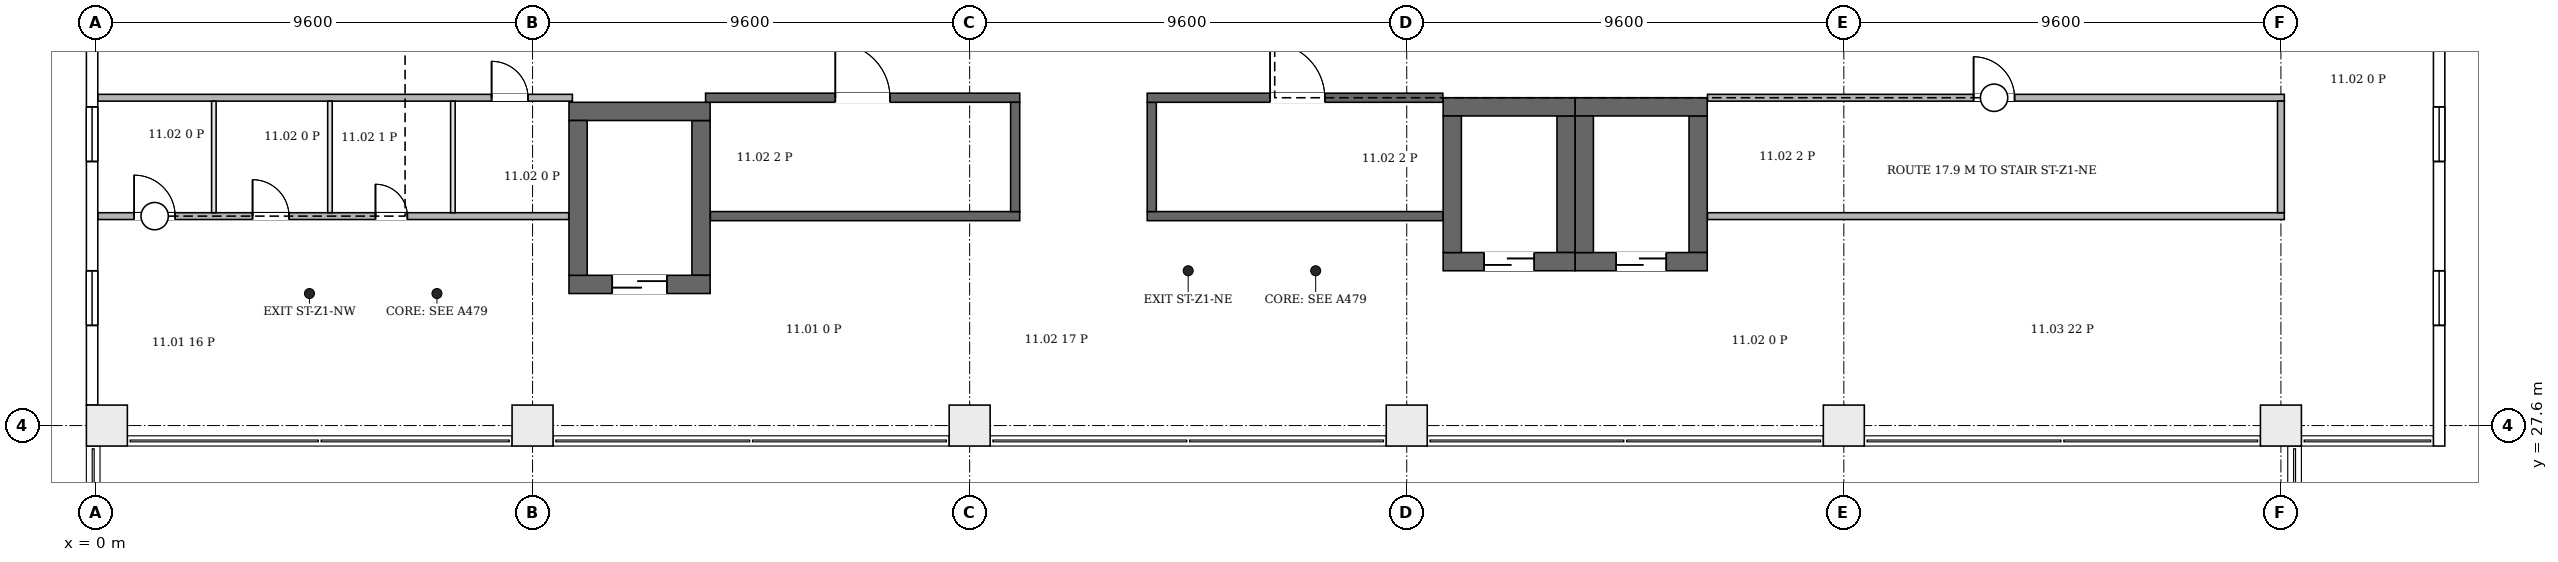
"""IFC4 building model, lengths in metres.
Left out: names, types, materials, properties, quantities, classifications, styles, units other than length and angle.
Written with IfcOpenShell. Run it as: python <this file> out.ifc"""

import sys

from ifc_helpers import new_model, si_unit, direction, frame, frame_2d, origin, origin_2d, place, context, subcontext, project, spatial, rectangle, extrude, element, fill, save


model = new_model("IFC4")
c1 = context("Model", 3, precision=1e-05, world=origin(), true_north=direction((0.0, 1.0)))
c2 = subcontext(c1, "Body", "Model", "MODEL_VIEW")
j1 = project(units=[si_unit("LENGTHUNIT", "METRE"), si_unit("PLANEANGLEUNIT", "RADIAN")], contexts=[c1])
p1 = place(None, origin())
s1 = spatial("IfcSite", under=j1, at=p1, CompositionType="ELEMENT")
p2 = place(p1, origin())
s2 = spatial("IfcBuilding", under=s1, at=p2, CompositionType="ELEMENT")
p3 = place(p2, frame((0.0, 0.0, 57.1)))
s3 = spatial("IfcBuildingStorey", under=s2, at=p3, CompositionType="ELEMENT", Elevation=57.1)
p4 = place(p3, frame((10.4, 30.7, 0.0), z_axis=(0.0, 0.0, 1.0), x_axis=(1.0, 0.0, 0.0)))
e1 = element("IfcWall", 1, at=p4, inside=s3, PredefinedType="SHEAR", context=c2, shape_type="SweptSolid", body=[
    extrude(rectangle(XDim=3.1, YDim=0.4, at=frame_2d((1.55, 0.0))), origin(), (0.0, 0.0, 1.0), 4.2),
])
p5 = place(p4, frame((0.95, 0.0, 0.0)))
e2 = element("IfcOpeningElement", 2, at=p5, cuts=e1, PredefinedType="OPENING", context=c2, shape_type="SweptSolid", body=[
    extrude(rectangle(XDim=1.2, YDim=2.1, at=frame_2d((0.6, 1.05))), frame((0.0, 0.21, 0.0), z_axis=(0.0, -1.0, 0.0), x_axis=(1.0, 0.0, 0.0)), (0.0, 0.0, 1.0), 0.42),
])
p6 = place(p3, frame((10.4, 34.5, 0.0), z_axis=(0.0, 0.0, 1.0), x_axis=(1.0, 0.0, 0.0)))
e3 = element("IfcWall", 3, at=p6, inside=s3, PredefinedType="SHEAR", context=c2, shape_type="SweptSolid", body=[
    extrude(rectangle(XDim=3.1, YDim=0.4, at=frame_2d((1.55, 0.0))), origin(), (0.0, 0.0, 1.0), 4.2),
])
for number, where, z_axis, x_axis in (
    (4, (10.6, 30.9, 0.0), (0.0, 0.0, 1.0), (0.0, 1.0, 0.0)),
    (5, (13.3, 30.9, 0.0), (0.0, 0.0, 1.0), (0.0, 1.0, 0.0)),
):
    element("IfcWall", number, at=place(p3, frame(where, z_axis=z_axis, x_axis=x_axis)), inside=s3, PredefinedType="SHEAR", context=c2, shape_type="SweptSolid", body=[
        extrude(rectangle(XDim=3.4, YDim=0.4, at=frame_2d((1.7, 0.0))), origin(), (0.0, 0.0, 1.0), 4.2),
    ])
p7 = place(p3, frame((29.6, 31.2, 0.0), z_axis=(0.0, 0.0, 1.0), x_axis=(1.0, 0.0, 0.0)))
e6 = element("IfcWall", 6, at=p7, inside=s3, PredefinedType="SHEAR", context=c2, shape_type="SweptSolid", body=[
    extrude(rectangle(XDim=2.9, YDim=0.4, at=frame_2d((1.45, 0.0))), origin(), (0.0, 0.0, 1.0), 4.2),
])
p8 = place(p7, frame((0.9, 0.0, 0.0)))
e7 = element("IfcOpeningElement", 7, at=p8, cuts=e6, PredefinedType="OPENING", context=c2, shape_type="SweptSolid", body=[
    extrude(rectangle(XDim=1.1, YDim=2.1, at=frame_2d((0.55, 1.05))), frame((0.0, 0.21, 0.0), z_axis=(0.0, -1.0, 0.0), x_axis=(1.0, 0.0, 0.0)), (0.0, 0.0, 1.0), 0.42),
])
p9 = place(p3, frame((29.6, 34.6, 0.0), z_axis=(0.0, 0.0, 1.0), x_axis=(1.0, 0.0, 0.0)))
e8 = element("IfcWall", 8, at=p9, inside=s3, PredefinedType="SHEAR", context=c2, shape_type="SweptSolid", body=[
    extrude(rectangle(XDim=2.9, YDim=0.4, at=frame_2d((1.45, 0.0))), origin(), (0.0, 0.0, 1.0), 4.2),
])
for number, where, z_axis, x_axis in (
    (9, (29.8, 31.4, 0.0), (0.0, 0.0, 1.0), (0.0, 1.0, 0.0)),
    (10, (32.3, 31.4, 0.0), (0.0, 0.0, 1.0), (0.0, 1.0, 0.0)),
):
    element("IfcWall", number, at=place(p3, frame(where, z_axis=z_axis, x_axis=x_axis)), inside=s3, PredefinedType="SHEAR", context=c2, shape_type="SweptSolid", body=[
        extrude(rectangle(XDim=3.0, YDim=0.4, at=frame_2d((1.5, 0.0))), origin(), (0.0, 0.0, 1.0), 4.2),
    ])
p10 = place(p3, frame((32.5, 31.2, 0.0), z_axis=(0.0, 0.0, 1.0), x_axis=(1.0, 0.0, 0.0)))
e11 = element("IfcWall", 11, at=p10, inside=s3, PredefinedType="SHEAR", context=c2, shape_type="SweptSolid", body=[
    extrude(rectangle(XDim=2.9, YDim=0.4, at=frame_2d((1.45, 0.0))), origin(), (0.0, 0.0, 1.0), 4.2),
])
p11 = place(p10, frame((0.9, 0.0, 0.0)))
e12 = element("IfcOpeningElement", 12, at=p11, cuts=e11, PredefinedType="OPENING", context=c2, shape_type="SweptSolid", body=[
    extrude(rectangle(XDim=1.1, YDim=2.1, at=frame_2d((0.55, 1.05))), frame((0.0, 0.21, 0.0), z_axis=(0.0, -1.0, 0.0), x_axis=(1.0, 0.0, 0.0)), (0.0, 0.0, 1.0), 0.42),
])
p12 = place(p3, frame((32.5, 34.6, 0.0), z_axis=(0.0, 0.0, 1.0), x_axis=(1.0, 0.0, 0.0)))
e13 = element("IfcWall", 13, at=p12, inside=s3, PredefinedType="SHEAR", context=c2, shape_type="SweptSolid", body=[
    extrude(rectangle(XDim=2.9, YDim=0.4, at=frame_2d((1.45, 0.0))), origin(), (0.0, 0.0, 1.0), 4.2),
])
for number, where, z_axis, x_axis in (
    (14, (32.7, 31.4, 0.0), (0.0, 0.0, 1.0), (0.0, 1.0, 0.0)),
    (15, (35.2, 31.4, 0.0), (0.0, 0.0, 1.0), (0.0, 1.0, 0.0)),
):
    element("IfcWall", number, at=place(p3, frame(where, z_axis=z_axis, x_axis=x_axis)), inside=s3, PredefinedType="SHEAR", context=c2, shape_type="SweptSolid", body=[
        extrude(rectangle(XDim=3.0, YDim=0.4, at=frame_2d((1.5, 0.0))), origin(), (0.0, 0.0, 1.0), 4.2),
    ])
for number, where, z_axis, x_axis in (
    (16, (0.25, 27.6, 0.0), (0.0, 0.0, 1.0), (1.0, 0.0, 0.0)),
    (17, (9.6, 27.6, 0.0), (0.0, 0.0, 1.0), (1.0, 0.0, 0.0)),
    (18, (19.2, 27.6, 0.0), (0.0, 0.0, 1.0), (1.0, 0.0, 0.0)),
    (19, (28.8, 27.6, 0.0), (0.0, 0.0, 1.0), (1.0, 0.0, 0.0)),
    (20, (38.4, 27.6, 0.0), (0.0, 0.0, 1.0), (1.0, 0.0, 0.0)),
    (21, (48.0, 27.6, 0.0), (0.0, 0.0, 1.0), (1.0, 0.0, 0.0)),
):
    element("IfcColumn", number, at=place(p3, frame(where, z_axis=z_axis, x_axis=x_axis)), inside=s3, PredefinedType="COLUMN", context=c2, shape_type="SweptSolid", body=[
        extrude(rectangle(XDim=0.9, YDim=0.9, at=origin_2d()), origin(), (0.0, 0.0, 1.0), 4.2),
    ])
p13 = place(p3, frame((-0.074, 36.35, 0.0), z_axis=(0.0, 0.0, 1.0), x_axis=(0.0, -1.0, 0.0)))
e22 = element("IfcWall", 22, at=p13, inside=s3, PredefinedType="ELEMENTEDWALL", context=c2, shape_type="SweptSolid", body=[
    extrude(rectangle(XDim=8.3, YDim=0.25, at=frame_2d((4.15, 0.0))), origin(), (0.0, 0.0, 1.0), 3.9),
])
p14 = place(p13, frame((5.35, 0.0, 0.9)))
e23 = element("IfcOpeningElement", 23, at=p14, cuts=e22, PredefinedType="OPENING", context=c2, shape_type="SweptSolid", body=[
    extrude(rectangle(XDim=1.2, YDim=2.6, at=frame_2d((0.6, 1.3))), frame((0.0, 0.135, 0.0), z_axis=(0.0, -1.0, 0.0), x_axis=(1.0, 0.0, 0.0)), (0.0, 0.0, 1.0), 0.27),
])
p15 = place(p13, frame((1.75, 0.0, 0.9)))
e24 = element("IfcOpeningElement", 24, at=p15, cuts=e22, PredefinedType="OPENING", context=c2, shape_type="SweptSolid", body=[
    extrude(rectangle(XDim=1.2, YDim=2.6, at=frame_2d((0.6, 1.3))), frame((0.0, 0.135, 0.0), z_axis=(0.0, -1.0, 0.0), x_axis=(1.0, 0.0, 0.0)), (0.0, 0.0, 1.0), 0.27),
])
p16 = place(p3, frame((51.475, 27.15, 0.0), z_axis=(0.0, 0.0, 1.0), x_axis=(0.0, 1.0, 0.0)))
e25 = element("IfcWall", 25, at=p16, inside=s3, PredefinedType="ELEMENTEDWALL", context=c2, shape_type="SweptSolid", body=[
    extrude(rectangle(XDim=19.3, YDim=0.25, at=frame_2d((9.65, 0.0))), origin(), (0.0, 0.0, 1.0), 3.2),
])
p17 = place(p16, frame((2.65, 0.0, 0.6)))
e26 = element("IfcOpeningElement", 26, at=p17, cuts=e25, PredefinedType="OPENING", context=c2, shape_type="SweptSolid", body=[
    extrude(rectangle(XDim=1.2, YDim=2.5, at=frame_2d((0.6, 1.25))), frame((0.0, 0.135, 0.0), z_axis=(0.0, -1.0, 0.0), x_axis=(1.0, 0.0, 0.0)), (0.0, 0.0, 1.0), 0.27),
])
p18 = place(p16, frame((6.25, 0.0, 0.6)))
e27 = element("IfcOpeningElement", 27, at=p18, cuts=e25, PredefinedType="OPENING", context=c2, shape_type="SweptSolid", body=[
    extrude(rectangle(XDim=1.2, YDim=2.5, at=frame_2d((0.6, 1.25))), frame((0.0, 0.135, 0.0), z_axis=(0.0, -1.0, 0.0), x_axis=(1.0, 0.0, 0.0)), (0.0, 0.0, 1.0), 0.27),
])
p19 = place(p16, frame((11.85, 0.0, 0.6)))
e28 = element("IfcOpeningElement", 28, at=p19, cuts=e25, PredefinedType="OPENING", context=c2, shape_type="SweptSolid", body=[
    extrude(rectangle(XDim=1.2, YDim=2.5, at=frame_2d((0.6, 1.25))), frame((0.0, 0.135, 0.0), z_axis=(0.0, -1.0, 0.0), x_axis=(1.0, 0.0, 0.0)), (0.0, 0.0, 1.0), 0.27),
])
p20 = place(p16, frame((15.45, 0.0, 0.6)))
e29 = element("IfcOpeningElement", 29, at=p20, cuts=e25, PredefinedType="OPENING", context=c2, shape_type="SweptSolid", body=[
    extrude(rectangle(XDim=1.2, YDim=2.5, at=frame_2d((0.6, 1.25))), frame((0.0, 0.135, 0.0), z_axis=(0.0, -1.0, 0.0), x_axis=(1.0, 0.0, 0.0)), (0.0, 0.0, 1.0), 0.27),
])
p21 = place(p3, frame((0.056, 32.2, 0.0), z_axis=(0.0, 0.0, 1.0), x_axis=(1.0, 0.0, 0.0)))
e30 = element("IfcWall", 30, at=p21, inside=s3, PredefinedType="PARTITIONING", context=c2, shape_type="SweptSolid", body=[
    extrude(rectangle(XDim=10.338, YDim=0.15, at=frame_2d((5.169, 0.0))), origin(), (0.0, 0.0, 1.0), 3.9),
])
p22 = place(p21, frame((0.794, 0.0, 0.0)))
e31 = element("IfcOpeningElement", 31, at=p22, cuts=e30, PredefinedType="OPENING", context=c2, shape_type="SweptSolid", body=[
    extrude(rectangle(XDim=0.9, YDim=2.1, at=frame_2d((0.45, 1.05))), frame((0.0, 0.085, 0.0), z_axis=(0.0, -1.0, 0.0), x_axis=(1.0, 0.0, 0.0)), (0.0, 0.0, 1.0), 0.17),
])
p23 = place(p21, frame((3.394, 0.0, 0.0)))
e32 = element("IfcOpeningElement", 32, at=p23, cuts=e30, PredefinedType="OPENING", context=c2, shape_type="SweptSolid", body=[
    extrude(rectangle(XDim=0.8, YDim=2.1, at=frame_2d((0.4, 1.05))), frame((0.0, 0.085, 0.0), z_axis=(0.0, -1.0, 0.0), x_axis=(1.0, 0.0, 0.0)), (0.0, 0.0, 1.0), 0.17),
])
p24 = place(p21, frame((6.094, 0.0, 0.0)))
e33 = element("IfcOpeningElement", 33, at=p24, cuts=e30, PredefinedType="OPENING", context=c2, shape_type="SweptSolid", body=[
    extrude(rectangle(XDim=0.7, YDim=2.1, at=frame_2d((0.35, 1.05))), frame((0.0, 0.085, 0.0), z_axis=(0.0, -1.0, 0.0), x_axis=(1.0, 0.0, 0.0)), (0.0, 0.0, 1.0), 0.17),
])
p25 = place(p3, frame((0.056, 34.8, 0.0), z_axis=(0.0, 0.0, 1.0), x_axis=(1.0, 0.0, 0.0)))
e34 = element("IfcWall", 34, at=p25, inside=s3, PredefinedType="PARTITIONING", context=c2, shape_type="SweptSolid", body=[
    extrude(rectangle(XDim=10.419, YDim=0.15, at=frame_2d((5.209, 0.0))), origin(), (0.0, 0.0, 1.0), 3.9),
])
p26 = place(p25, frame((8.644, 0.0, 0.0)))
e35 = element("IfcOpeningElement", 35, at=p26, cuts=e34, PredefinedType="OPENING", context=c2, shape_type="SweptSolid", body=[
    extrude(rectangle(XDim=0.8, YDim=2.1, at=frame_2d((0.4, 1.05))), frame((0.0, 0.085, 0.0), z_axis=(0.0, -1.0, 0.0), x_axis=(1.0, 0.0, 0.0)), (0.0, 0.0, 1.0), 0.17),
])
for number, where, z_axis, x_axis in (
    (36, (2.6, 32.275, 0.0), (0.0, 0.0, 1.0), (0.0, 1.0, 0.0)),
    (37, (5.15, 32.275, 0.0), (0.0, 0.0, 1.0), (0.0, 1.0, 0.0)),
    (38, (7.85, 32.275, 0.0), (0.0, 0.0, 1.0), (0.0, 1.0, 0.0)),
):
    element("IfcWall", number, at=place(p3, frame(where, z_axis=z_axis, x_axis=x_axis)), inside=s3, PredefinedType="PARTITIONING", context=c2, shape_type="SweptSolid", body=[
        extrude(rectangle(XDim=2.45, YDim=0.1, at=frame_2d((1.225, 0.0))), origin(), (0.0, 0.0, 1.0), 3.9),
    ])
p27 = place(p3, frame((13.4, 34.8, 0.0), z_axis=(0.0, 0.0, 1.0), x_axis=(1.0, 0.0, 0.0)))
e39 = element("IfcWall", 39, at=p27, inside=s3, PredefinedType="PARTITIONING", context=c2, shape_type="SweptSolid", body=[
    extrude(rectangle(XDim=6.9, YDim=0.2, at=frame_2d((3.45, 0.0))), origin(), (0.0, 0.0, 1.0), 3.9),
])
p28 = place(p27, frame((2.85, 0.0, 0.0)))
e40 = element("IfcOpeningElement", 40, at=p28, cuts=e39, PredefinedType="OPENING", context=c2, shape_type="SweptSolid", body=[
    extrude(rectangle(XDim=1.2, YDim=2.1, at=frame_2d((0.6, 1.05))), frame((0.0, 0.11, 0.0), z_axis=(0.0, -1.0, 0.0), x_axis=(1.0, 0.0, 0.0)), (0.0, 0.0, 1.0), 0.22),
])
p29 = place(p3, frame((13.506, 32.2, 0.0), z_axis=(0.0, 0.0, 1.0), x_axis=(1.0, 0.0, 0.0)))
e41 = element("IfcWall", 41, at=p29, inside=s3, PredefinedType="PARTITIONING", context=c2, shape_type="SweptSolid", body=[
    extrude(rectangle(XDim=6.794, YDim=0.2, at=frame_2d((3.397, 0.0))), origin(), (0.0, 0.0, 1.0), 3.9),
])
p30 = place(p3, frame((20.2, 32.3, 0.0), z_axis=(0.0, 0.0, 1.0), x_axis=(0.0, 1.0, 0.0)))
e42 = element("IfcWall", 42, at=p30, inside=s3, PredefinedType="PARTITIONING", context=c2, shape_type="SweptSolid", body=[
    extrude(rectangle(XDim=2.4, YDim=0.2, at=frame_2d((1.2, 0.0))), origin(), (0.0, 0.0, 1.0), 3.9),
])
p31 = place(p3, frame((23.1, 32.2, 0.0), z_axis=(0.0, 0.0, 1.0), x_axis=(1.0, 0.0, 0.0)))
e43 = element("IfcWall", 43, at=p31, inside=s3, PredefinedType="PARTITIONING", context=c2, shape_type="SweptSolid", body=[
    extrude(rectangle(XDim=6.494, YDim=0.2, at=frame_2d((3.247, 0.0))), origin(), (0.0, 0.0, 1.0), 3.9),
])
p32 = place(p3, frame((23.2, 32.3, 0.0), z_axis=(0.0, 0.0, 1.0), x_axis=(0.0, 1.0, 0.0)))
e44 = element("IfcWall", 44, at=p32, inside=s3, PredefinedType="PARTITIONING", context=c2, shape_type="SweptSolid", body=[
    extrude(rectangle(XDim=2.4, YDim=0.2, at=frame_2d((1.2, 0.0))), origin(), (0.0, 0.0, 1.0), 3.9),
])
p33 = place(p3, frame((23.1, 34.8, 0.0), z_axis=(0.0, 0.0, 1.0), x_axis=(1.0, 0.0, 0.0)))
e45 = element("IfcWall", 45, at=p33, inside=s3, PredefinedType="PARTITIONING", context=c2, shape_type="SweptSolid", body=[
    extrude(rectangle(XDim=6.494, YDim=0.2, at=frame_2d((3.247, 0.0))), origin(), (0.0, 0.0, 1.0), 3.9),
])
p34 = place(p33, frame((2.7, 0.0, 0.0)))
e46 = element("IfcOpeningElement", 46, at=p34, cuts=e45, PredefinedType="OPENING", context=c2, shape_type="SweptSolid", body=[
    extrude(rectangle(XDim=1.2, YDim=2.1, at=frame_2d((0.6, 1.05))), frame((0.0, 0.11, 0.0), z_axis=(0.0, -1.0, 0.0), x_axis=(1.0, 0.0, 0.0)), (0.0, 0.0, 1.0), 0.22),
])
p35 = place(p3, frame((35.406, 32.2, 0.0), z_axis=(0.0, 0.0, 1.0), x_axis=(1.0, 0.0, 0.0)))
e47 = element("IfcWall", 47, at=p35, inside=s3, PredefinedType="PARTITIONING", context=c2, shape_type="SweptSolid", body=[
    extrude(rectangle(XDim=12.669, YDim=0.15, at=frame_2d((6.334, 0.0))), origin(), (0.0, 0.0, 1.0), 3.9),
])
p36 = place(p3, frame((35.406, 34.8, 0.0), z_axis=(0.0, 0.0, 1.0), x_axis=(1.0, 0.0, 0.0)))
e48 = element("IfcWall", 48, at=p36, inside=s3, PredefinedType="PARTITIONING", context=c2, shape_type="SweptSolid", body=[
    extrude(rectangle(XDim=12.669, YDim=0.15, at=frame_2d((6.334, 0.0))), origin(), (0.0, 0.0, 1.0), 3.9),
])
p37 = place(p36, frame((5.844, 0.0, 0.0)))
e49 = element("IfcOpeningElement", 49, at=p37, cuts=e48, PredefinedType="OPENING", context=c2, shape_type="SweptSolid", body=[
    extrude(rectangle(XDim=0.9, YDim=2.1, at=frame_2d((0.45, 1.05))), frame((0.0, 0.085, 0.0), z_axis=(0.0, -1.0, 0.0), x_axis=(1.0, 0.0, 0.0)), (0.0, 0.0, 1.0), 0.17),
])
p38 = place(p3, frame((48.0, 32.275, 0.0), z_axis=(0.0, 0.0, 1.0), x_axis=(0.0, 1.0, 0.0)))
e50 = element("IfcWall", 50, at=p38, inside=s3, PredefinedType="PARTITIONING", context=c2, shape_type="SweptSolid", body=[
    extrude(rectangle(XDim=2.45, YDim=0.15, at=frame_2d((1.225, 0.0))), origin(), (0.0, 0.0, 1.0), 3.3),
])
p39 = place(p14, origin())
e51 = element("IfcWindow", 51, at=p39, inside=s3, PartitioningType="SINGLE_PANEL", PredefinedType="WINDOW", context=c2, shape_type="SweptSolid", body=[
    extrude(rectangle(XDim=1.2, YDim=2.6, at=frame_2d((0.6, 1.3))), frame((0.0, 0.03, 0.0), z_axis=(0.0, -1.0, 0.0), x_axis=(1.0, 0.0, 0.0)), (0.0, 0.0, 1.0), 0.06),
])
fill(e23, e51)
p40 = place(p15, origin())
e52 = element("IfcWindow", 52, at=p40, inside=s3, PartitioningType="SINGLE_PANEL", PredefinedType="WINDOW", context=c2, shape_type="SweptSolid", body=[
    extrude(rectangle(XDim=1.2, YDim=2.6, at=frame_2d((0.6, 1.3))), frame((0.0, 0.03, 0.0), z_axis=(0.0, -1.0, 0.0), x_axis=(1.0, 0.0, 0.0)), (0.0, 0.0, 1.0), 0.06),
])
fill(e24, e52)
p41 = place(p17, origin())
e53 = element("IfcWindow", 53, at=p41, inside=s3, PartitioningType="SINGLE_PANEL", PredefinedType="WINDOW", context=c2, shape_type="SweptSolid", body=[
    extrude(rectangle(XDim=1.2, YDim=2.5, at=frame_2d((0.6, 1.25))), frame((0.0, 0.03, 0.0), z_axis=(0.0, -1.0, 0.0), x_axis=(1.0, 0.0, 0.0)), (0.0, 0.0, 1.0), 0.06),
])
fill(e26, e53)
p42 = place(p18, origin())
e54 = element("IfcWindow", 54, at=p42, inside=s3, PartitioningType="SINGLE_PANEL", PredefinedType="WINDOW", context=c2, shape_type="SweptSolid", body=[
    extrude(rectangle(XDim=1.2, YDim=2.5, at=frame_2d((0.6, 1.25))), frame((0.0, 0.03, 0.0), z_axis=(0.0, -1.0, 0.0), x_axis=(1.0, 0.0, 0.0)), (0.0, 0.0, 1.0), 0.06),
])
fill(e27, e54)
p43 = place(p5, origin())
e55 = element("IfcDoor", 55, at=p43, inside=s3, OperationType="DOUBLE_DOOR_SLIDING", PredefinedType="DOOR", context=c2, shape_type="SweptSolid", body=[
    extrude(rectangle(XDim=1.2, YDim=2.1, at=frame_2d((0.6, 1.05))), frame((0.0, 0.025, 0.0), z_axis=(0.0, -1.0, 0.0), x_axis=(1.0, 0.0, 0.0)), (0.0, 0.0, 1.0), 0.05),
])
fill(e2, e55)
p44 = place(p8, origin())
e56 = element("IfcDoor", 56, at=p44, inside=s3, OperationType="DOUBLE_DOOR_SLIDING", PredefinedType="DOOR", context=c2, shape_type="SweptSolid", body=[
    extrude(rectangle(XDim=1.1, YDim=2.1, at=frame_2d((0.55, 1.05))), frame((0.0, 0.025, 0.0), z_axis=(0.0, -1.0, 0.0), x_axis=(1.0, 0.0, 0.0)), (0.0, 0.0, 1.0), 0.05),
])
fill(e7, e56)
p45 = place(p11, origin())
e57 = element("IfcDoor", 57, at=p45, inside=s3, OperationType="DOUBLE_DOOR_SLIDING", PredefinedType="DOOR", context=c2, shape_type="SweptSolid", body=[
    extrude(rectangle(XDim=1.1, YDim=2.1, at=frame_2d((0.55, 1.05))), frame((0.0, 0.025, 0.0), z_axis=(0.0, -1.0, 0.0), x_axis=(1.0, 0.0, 0.0)), (0.0, 0.0, 1.0), 0.05),
])
fill(e12, e57)
p46 = place(p22, origin())
e58 = element("IfcDoor", 58, at=p46, inside=s3, OperationType="SINGLE_SWING_RIGHT", PredefinedType="DOOR", context=c2, shape_type="SweptSolid", body=[
    extrude(rectangle(XDim=0.9, YDim=2.1, at=frame_2d((0.45, 1.05))), frame((0.0, 0.025, 0.0), z_axis=(0.0, -1.0, 0.0), x_axis=(1.0, 0.0, 0.0)), (0.0, 0.0, 1.0), 0.05),
])
fill(e31, e58)
p47 = place(p23, origin())
e59 = element("IfcDoor", 59, at=p47, inside=s3, OperationType="SINGLE_SWING_RIGHT", PredefinedType="DOOR", context=c2, shape_type="SweptSolid", body=[
    extrude(rectangle(XDim=0.8, YDim=2.1, at=frame_2d((0.4, 1.05))), frame((0.0, 0.025, 0.0), z_axis=(0.0, -1.0, 0.0), x_axis=(1.0, 0.0, 0.0)), (0.0, 0.0, 1.0), 0.05),
])
fill(e32, e59)
p48 = place(p24, origin())
e60 = element("IfcDoor", 60, at=p48, inside=s3, OperationType="SINGLE_SWING_RIGHT", PredefinedType="DOOR", context=c2, shape_type="SweptSolid", body=[
    extrude(rectangle(XDim=0.7, YDim=2.1, at=frame_2d((0.35, 1.05))), frame((0.0, 0.025, 0.0), z_axis=(0.0, -1.0, 0.0), x_axis=(1.0, 0.0, 0.0)), (0.0, 0.0, 1.0), 0.05),
])
fill(e33, e60)
p49 = place(p26, origin())
e61 = element("IfcDoor", 61, at=p49, inside=s3, OperationType="SINGLE_SWING_LEFT", PredefinedType="DOOR", context=c2, shape_type="SweptSolid", body=[
    extrude(rectangle(XDim=0.8, YDim=2.1, at=frame_2d((0.4, 1.05))), frame((0.0, 0.025, 0.0), z_axis=(0.0, -1.0, 0.0), x_axis=(1.0, 0.0, 0.0)), (0.0, 0.0, 1.0), 0.05),
])
fill(e35, e61)
p50 = place(p28, origin())
e62 = element("IfcDoor", 62, at=p50, inside=s3, OperationType="SINGLE_SWING_RIGHT", PredefinedType="DOOR", context=c2, shape_type="SweptSolid", body=[
    extrude(rectangle(XDim=1.2, YDim=2.1, at=frame_2d((0.6, 1.05))), frame((0.0, 0.025, 0.0), z_axis=(0.0, -1.0, 0.0), x_axis=(1.0, 0.0, 0.0)), (0.0, 0.0, 1.0), 0.05),
])
fill(e40, e62)
p51 = place(p34, origin())
e63 = element("IfcDoor", 63, at=p51, inside=s3, OperationType="SINGLE_SWING_LEFT", PredefinedType="DOOR", context=c2, shape_type="SweptSolid", body=[
    extrude(rectangle(XDim=1.2, YDim=2.1, at=frame_2d((0.6, 1.05))), frame((0.0, 0.025, 0.0), z_axis=(0.0, -1.0, 0.0), x_axis=(1.0, 0.0, 0.0)), (0.0, 0.0, 1.0), 0.05),
])
fill(e46, e63)
p52 = place(p37, origin())
e64 = element("IfcDoor", 64, at=p52, inside=s3, OperationType="SINGLE_SWING_RIGHT", PredefinedType="DOOR", context=c2, shape_type="SweptSolid", body=[
    extrude(rectangle(XDim=0.9, YDim=2.1, at=frame_2d((0.45, 1.05))), frame((0.0, 0.025, 0.0), z_axis=(0.0, -1.0, 0.0), x_axis=(1.0, 0.0, 0.0)), (0.0, 0.0, 1.0), 0.05),
])
fill(e49, e64)
save(model, sys.argv[1])
